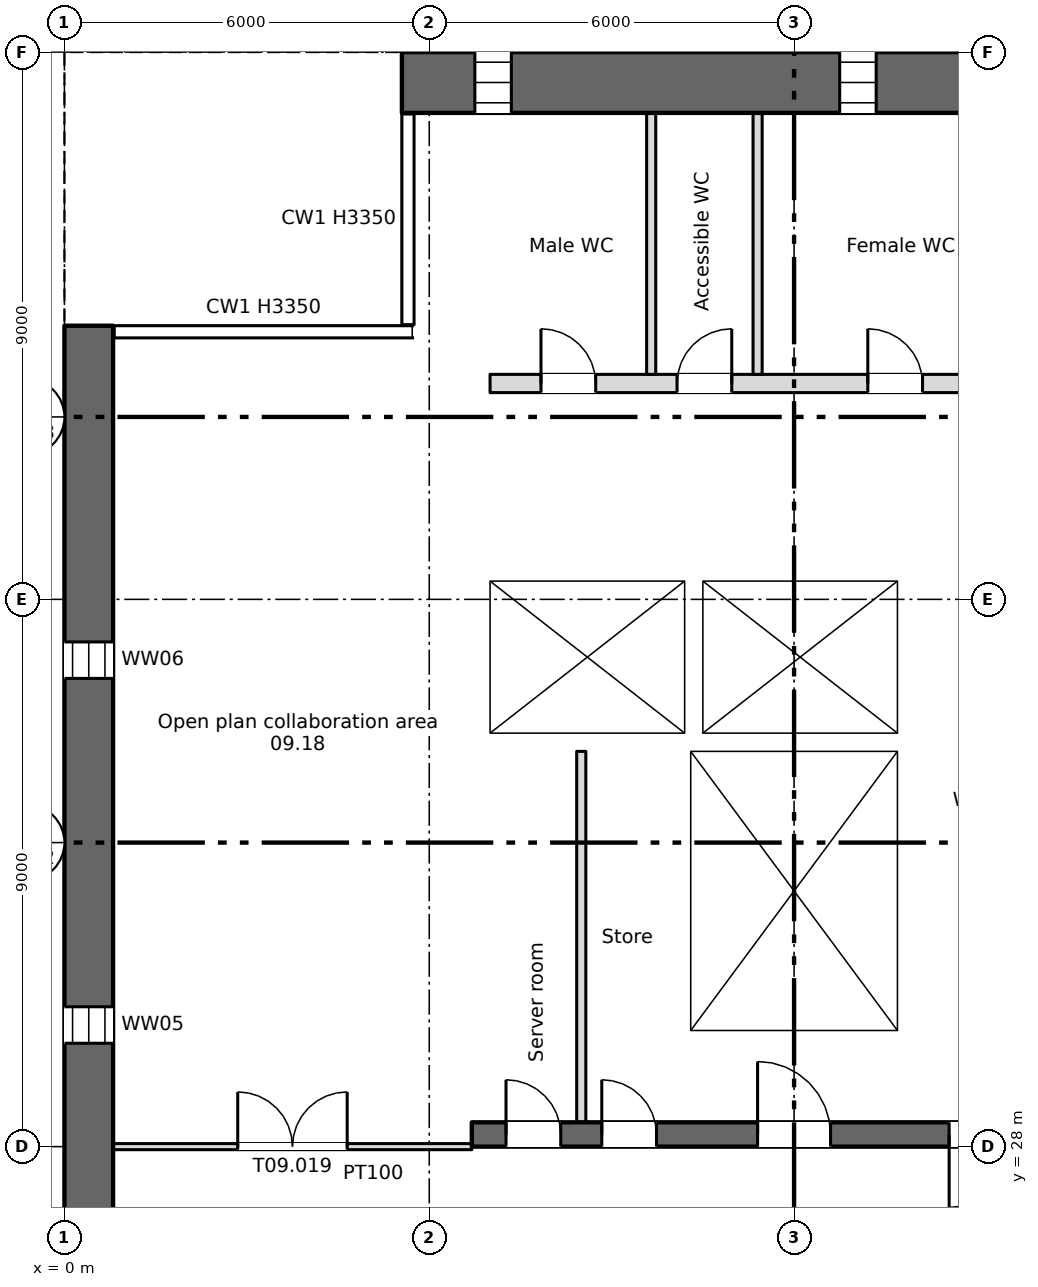
"""IFC4 building model, lengths in metres.
Left out: names, types, materials, properties, quantities, classifications, styles, units other than length and angle.
Written with IfcOpenShell. Run it as: python <this file> out.ifc"""

import sys

from ifc_helpers import new_model, si_unit, direction, frame, frame_2d, origin, place, context, subcontext, project, spatial, rectangle, extrude, element, fill, save


model = new_model("IFC4")
c1 = context("Model", 3, precision=1e-05, world=origin(), true_north=direction((0.0, 1.0)))
c2 = subcontext(c1, "Body", "Model", "MODEL_VIEW")
j1 = project(units=[si_unit("LENGTHUNIT", "METRE"), si_unit("PLANEANGLEUNIT", "RADIAN")], contexts=[c1])
p1 = place(None, origin())
s1 = spatial("IfcSite", under=j1, at=p1, CompositionType="ELEMENT")
p2 = place(p1, origin())
s2 = spatial("IfcBuilding", under=s1, at=p2, CompositionType="ELEMENT")
p3 = place(p2, frame((0.0, 0.0, 41.25)))
s3 = spatial("IfcBuildingStorey", under=s2, at=p3, CompositionType="ELEMENT", Elevation=41.25)
p4 = place(p3, frame((0.4, 4.5, 0.0), z_axis=(0.0, 0.0, 1.0), x_axis=(0.0, 1.0, 0.0)))
e1 = element("IfcWall", 1, at=p4, inside=s3, PredefinedType="SHEAR", context=c2, shape_type="SweptSolid", body=[
    extrude(rectangle(XDim=37.0, YDim=0.8, at=frame_2d((18.5, 0.0))), origin(), (0.0, 0.0, 1.0), 3.35),
])
p5 = place(p4, frame((1.2, 0.0, 0.6)))
e2 = element("IfcOpeningElement", 2, at=p5, cuts=e1, PredefinedType="OPENING", context=c2, shape_type="SweptSolid", body=[
    extrude(rectangle(XDim=0.6, YDim=2.4, at=frame_2d((0.3, 1.2))), frame((0.0, 0.41, 0.0), z_axis=(0.0, -1.0, 0.0), x_axis=(1.0, 0.0, 0.0)), (0.0, 0.0, 1.0), 0.82),
])
p6 = place(p4, frame((7.2, 0.0, 0.6)))
e3 = element("IfcOpeningElement", 3, at=p6, cuts=e1, PredefinedType="OPENING", context=c2, shape_type="SweptSolid", body=[
    extrude(rectangle(XDim=0.6, YDim=2.4, at=frame_2d((0.3, 1.2))), frame((0.0, 0.41, 0.0), z_axis=(0.0, -1.0, 0.0), x_axis=(1.0, 0.0, 0.0)), (0.0, 0.0, 1.0), 0.82),
])
p7 = place(p4, frame((13.2, 0.0, 0.6)))
e4 = element("IfcOpeningElement", 4, at=p7, cuts=e1, PredefinedType="OPENING", context=c2, shape_type="SweptSolid", body=[
    extrude(rectangle(XDim=0.6, YDim=2.4, at=frame_2d((0.3, 1.2))), frame((0.0, 0.41, 0.0), z_axis=(0.0, -1.0, 0.0), x_axis=(1.0, 0.0, 0.0)), (0.0, 0.0, 1.0), 0.82),
])
p8 = place(p4, frame((19.2, 0.0, 0.6)))
e5 = element("IfcOpeningElement", 5, at=p8, cuts=e1, PredefinedType="OPENING", context=c2, shape_type="SweptSolid", body=[
    extrude(rectangle(XDim=0.6, YDim=2.4, at=frame_2d((0.3, 1.2))), frame((0.0, 0.41, 0.0), z_axis=(0.0, -1.0, 0.0), x_axis=(1.0, 0.0, 0.0)), (0.0, 0.0, 1.0), 0.82),
])
p9 = place(p4, frame((25.2, 0.0, 0.6)))
e6 = element("IfcOpeningElement", 6, at=p9, cuts=e1, PredefinedType="OPENING", context=c2, shape_type="SweptSolid", body=[
    extrude(rectangle(XDim=0.6, YDim=2.4, at=frame_2d((0.3, 1.2))), frame((0.0, 0.41, 0.0), z_axis=(0.0, -1.0, 0.0), x_axis=(1.0, 0.0, 0.0)), (0.0, 0.0, 1.0), 0.82),
])
p10 = place(p4, frame((31.2, 0.0, 0.6)))
e7 = element("IfcOpeningElement", 7, at=p10, cuts=e1, PredefinedType="OPENING", context=c2, shape_type="SweptSolid", body=[
    extrude(rectangle(XDim=0.6, YDim=2.4, at=frame_2d((0.3, 1.2))), frame((0.0, 0.41, 0.0), z_axis=(0.0, -1.0, 0.0), x_axis=(1.0, 0.0, 0.0)), (0.0, 0.0, 1.0), 0.82),
])
p11 = place(p3, frame((5.55, 45.5, 0.0), z_axis=(0.0, 0.0, 1.0), x_axis=(1.0, 0.0, 0.0)))
e8 = element("IfcWall", 8, at=p11, inside=s3, PredefinedType="SHEAR", context=c2, shape_type="SweptSolid", body=[
    extrude(rectangle(XDim=66.9, YDim=1.0, at=frame_2d((33.45, 0.0))), origin(), (0.0, 0.0, 1.0), 3.35),
])
p12 = place(p11, frame((1.2, 0.0, 0.6)))
e9 = element("IfcOpeningElement", 9, at=p12, cuts=e8, PredefinedType="OPENING", context=c2, shape_type="SweptSolid", body=[
    extrude(rectangle(XDim=0.6, YDim=2.4, at=frame_2d((0.3, 1.2))), frame((0.0, 0.51, 0.0), z_axis=(0.0, -1.0, 0.0), x_axis=(1.0, 0.0, 0.0)), (0.0, 0.0, 1.0), 1.02),
])
p13 = place(p11, frame((7.2, 0.0, 0.6)))
e10 = element("IfcOpeningElement", 10, at=p13, cuts=e8, PredefinedType="OPENING", context=c2, shape_type="SweptSolid", body=[
    extrude(rectangle(XDim=0.6, YDim=2.4, at=frame_2d((0.3, 1.2))), frame((0.0, 0.51, 0.0), z_axis=(0.0, -1.0, 0.0), x_axis=(1.0, 0.0, 0.0)), (0.0, 0.0, 1.0), 1.02),
])
p14 = place(p11, frame((55.2, 0.0, 0.6)))
e11 = element("IfcOpeningElement", 11, at=p14, cuts=e8, PredefinedType="OPENING", context=c2, shape_type="SweptSolid", body=[
    extrude(rectangle(XDim=0.6, YDim=2.4, at=frame_2d((0.3, 1.2))), frame((0.0, 0.51, 0.0), z_axis=(0.0, -1.0, 0.0), x_axis=(1.0, 0.0, 0.0)), (0.0, 0.0, 1.0), 1.02),
])
p15 = place(p11, frame((61.2, 0.0, 0.6)))
e12 = element("IfcOpeningElement", 12, at=p15, cuts=e8, PredefinedType="OPENING", context=c2, shape_type="SweptSolid", body=[
    extrude(rectangle(XDim=0.6, YDim=2.4, at=frame_2d((0.3, 1.2))), frame((0.0, 0.51, 0.0), z_axis=(0.0, -1.0, 0.0), x_axis=(1.0, 0.0, 0.0)), (0.0, 0.0, 1.0), 1.02),
])
p16 = place(p3, frame((6.7, 28.2, 0.0), z_axis=(0.0, 0.0, 1.0), x_axis=(1.0, 0.0, 0.0)))
e13 = element("IfcWall", 13, at=p16, inside=s3, PredefinedType="SHEAR", context=c2, shape_type="SweptSolid", body=[
    extrude(rectangle(XDim=57.8, YDim=0.4, at=frame_2d((28.9, 0.0))), origin(), (0.0, 0.0, 1.0), 3.35),
])
p17 = place(p16, frame((12.812, 0.0, 0.0)))
e14 = element("IfcOpeningElement", 14, at=p17, cuts=e13, PredefinedType="OPENING", context=c2, shape_type="SweptSolid", body=[
    extrude(rectangle(XDim=0.9, YDim=2.1, at=frame_2d((0.45, 1.05))), frame((0.0, 0.21, 0.0), z_axis=(0.0, -1.0, 0.0), x_axis=(1.0, 0.0, 0.0)), (0.0, 0.0, 1.0), 0.42),
])
p18 = place(p16, frame((15.387, 0.0, 0.0)))
e15 = element("IfcOpeningElement", 15, at=p18, cuts=e13, PredefinedType="OPENING", context=c2, shape_type="SweptSolid", body=[
    extrude(rectangle(XDim=0.9, YDim=2.1, at=frame_2d((0.45, 1.05))), frame((0.0, 0.21, 0.0), z_axis=(0.0, -1.0, 0.0), x_axis=(1.0, 0.0, 0.0)), (0.0, 0.0, 1.0), 0.42),
])
p19 = place(p16, frame((48.312, 0.0, 0.0)))
e16 = element("IfcOpeningElement", 16, at=p19, cuts=e13, PredefinedType="OPENING", context=c2, shape_type="SweptSolid", body=[
    extrude(rectangle(XDim=0.9, YDim=2.1, at=frame_2d((0.45, 1.05))), frame((0.0, 0.21, 0.0), z_axis=(0.0, -1.0, 0.0), x_axis=(1.0, 0.0, 0.0)), (0.0, 0.0, 1.0), 0.42),
])
p20 = place(p16, frame((50.887, 0.0, 0.0)))
e17 = element("IfcOpeningElement", 17, at=p20, cuts=e13, PredefinedType="OPENING", context=c2, shape_type="SweptSolid", body=[
    extrude(rectangle(XDim=0.9, YDim=2.1, at=frame_2d((0.45, 1.05))), frame((0.0, 0.21, 0.0), z_axis=(0.0, -1.0, 0.0), x_axis=(1.0, 0.0, 0.0)), (0.0, 0.0, 1.0), 0.42),
])
p21 = place(p16, frame((0.562, 0.0, 0.0)))
e18 = element("IfcOpeningElement", 18, at=p21, cuts=e13, PredefinedType="OPENING", context=c2, shape_type="SweptSolid", body=[
    extrude(rectangle(XDim=0.9, YDim=2.1, at=frame_2d((0.45, 1.05))), frame((0.0, 0.21, 0.0), z_axis=(0.0, -1.0, 0.0), x_axis=(1.0, 0.0, 0.0)), (0.0, 0.0, 1.0), 0.42),
])
p22 = place(p16, frame((2.137, 0.0, 0.0)))
e19 = element("IfcOpeningElement", 19, at=p22, cuts=e13, PredefinedType="OPENING", context=c2, shape_type="SweptSolid", body=[
    extrude(rectangle(XDim=0.9, YDim=2.1, at=frame_2d((0.45, 1.05))), frame((0.0, 0.21, 0.0), z_axis=(0.0, -1.0, 0.0), x_axis=(1.0, 0.0, 0.0)), (0.0, 0.0, 1.0), 0.42),
])
p23 = place(p16, frame((4.7, 0.0, 0.0)))
e20 = element("IfcOpeningElement", 20, at=p23, cuts=e13, PredefinedType="OPENING", context=c2, shape_type="SweptSolid", body=[
    extrude(rectangle(XDim=1.2, YDim=2.1, at=frame_2d((0.6, 1.05))), frame((0.0, 0.21, 0.0), z_axis=(0.0, -1.0, 0.0), x_axis=(1.0, 0.0, 0.0)), (0.0, 0.0, 1.0), 0.42),
])
p24 = place(p16, frame((31.7, 0.0, 0.0)))
e21 = element("IfcOpeningElement", 21, at=p24, cuts=e13, PredefinedType="OPENING", context=c2, shape_type="SweptSolid", body=[
    extrude(rectangle(XDim=1.2, YDim=2.1, at=frame_2d((0.6, 1.05))), frame((0.0, 0.21, 0.0), z_axis=(0.0, -1.0, 0.0), x_axis=(1.0, 0.0, 0.0)), (0.0, 0.0, 1.0), 0.42),
])
p25 = place(p16, frame((55.2, 0.0, 0.0)))
e22 = element("IfcOpeningElement", 22, at=p25, cuts=e13, PredefinedType="OPENING", context=c2, shape_type="SweptSolid", body=[
    extrude(rectangle(XDim=1.2, YDim=2.1, at=frame_2d((0.6, 1.05))), frame((0.0, 0.21, 0.0), z_axis=(0.0, -1.0, 0.0), x_axis=(1.0, 0.0, 0.0)), (0.0, 0.0, 1.0), 0.42),
])
p26 = place(p16, frame((21.7, 0.0, 0.0)))
e23 = element("IfcOpeningElement", 23, at=p26, cuts=e13, PredefinedType="OPENING", context=c2, shape_type="SweptSolid", body=[
    extrude(rectangle(XDim=1.2, YDim=2.1, at=frame_2d((0.6, 1.05))), frame((0.0, 0.21, 0.0), z_axis=(0.0, -1.0, 0.0), x_axis=(1.0, 0.0, 0.0)), (0.0, 0.0, 1.0), 0.42),
])
p27 = place(p16, frame((41.7, 0.0, 0.0)))
e24 = element("IfcOpeningElement", 24, at=p27, cuts=e13, PredefinedType="OPENING", context=c2, shape_type="SweptSolid", body=[
    extrude(rectangle(XDim=1.2, YDim=2.1, at=frame_2d((0.6, 1.05))), frame((0.0, 0.21, 0.0), z_axis=(0.0, -1.0, 0.0), x_axis=(1.0, 0.0, 0.0)), (0.0, 0.0, 1.0), 0.42),
])
p28 = place(p16, frame((24.85, 0.0, 0.0)))
e25 = element("IfcOpeningElement", 25, at=p28, cuts=e13, PredefinedType="OPENING", context=c2, shape_type="SweptSolid", body=[
    extrude(rectangle(XDim=2.4, YDim=2.1, at=frame_2d((1.2, 1.05))), frame((0.0, 0.21, 0.0), z_axis=(0.0, -1.0, 0.0), x_axis=(1.0, 0.0, 0.0)), (0.0, 0.0, 1.0), 0.42),
])
p29 = place(p16, frame((37.35, 0.0, 0.0)))
e26 = element("IfcOpeningElement", 26, at=p29, cuts=e13, PredefinedType="OPENING", context=c2, shape_type="SweptSolid", body=[
    extrude(rectangle(XDim=2.4, YDim=2.1, at=frame_2d((1.2, 1.05))), frame((0.0, 0.21, 0.0), z_axis=(0.0, -1.0, 0.0), x_axis=(1.0, 0.0, 0.0)), (0.0, 0.0, 1.0), 0.42),
])
p30 = place(p16, frame((7.85, 0.0, 0.0)))
e27 = element("IfcOpeningElement", 27, at=p30, cuts=e13, PredefinedType="OPENING", context=c2, shape_type="SweptSolid", body=[
    extrude(rectangle(XDim=2.4, YDim=2.1, at=frame_2d((1.2, 1.05))), frame((0.0, 0.21, 0.0), z_axis=(0.0, -1.0, 0.0), x_axis=(1.0, 0.0, 0.0)), (0.0, 0.0, 1.0), 0.42),
])
p31 = place(p16, frame((28.85, 0.0, 0.0)))
e28 = element("IfcOpeningElement", 28, at=p31, cuts=e13, PredefinedType="OPENING", context=c2, shape_type="SweptSolid", body=[
    extrude(rectangle(XDim=0.9, YDim=2.1, at=frame_2d((0.45, 1.05))), frame((0.0, 0.21, 0.0), z_axis=(0.0, -1.0, 0.0), x_axis=(1.0, 0.0, 0.0)), (0.0, 0.0, 1.0), 0.42),
])
p32 = place(p16, frame((34.85, 0.0, 0.0)))
e29 = element("IfcOpeningElement", 29, at=p32, cuts=e13, PredefinedType="OPENING", context=c2, shape_type="SweptSolid", body=[
    extrude(rectangle(XDim=0.9, YDim=2.1, at=frame_2d((0.45, 1.05))), frame((0.0, 0.21, 0.0), z_axis=(0.0, -1.0, 0.0), x_axis=(1.0, 0.0, 0.0)), (0.0, 0.0, 1.0), 0.42),
])
p33 = place(p3, frame((6.85, 28.4, 0.0), z_axis=(0.0, 0.0, 1.0), x_axis=(0.0, 1.0, 0.0)))
e30 = element("IfcWall", 30, at=p33, inside=s3, PredefinedType="SHEAR", context=c2, shape_type="SweptSolid", body=[
    extrude(rectangle(XDim=16.6, YDim=0.3, at=frame_2d((8.3, 0.0))), origin(), (0.0, 0.0, 1.0), 3.35),
])
for number, where, z_axis, x_axis in (
    (31, (10.15, 28.4, 0.0), (0.0, 0.0, 1.0), (0.0, 1.0, 0.0)),
    (32, (13.85, 28.4, 0.0), (0.0, 0.0, 1.0), (0.0, 1.0, 0.0)),
):
    element("IfcWall", number, at=place(p3, frame(where, z_axis=z_axis, x_axis=x_axis)), inside=s3, PredefinedType="SHEAR", context=c2, shape_type="SweptSolid", body=[
        extrude(rectangle(XDim=6.1, YDim=0.3, at=frame_2d((3.05, 0.0))), origin(), (0.0, 0.0, 1.0), 3.35),
    ])
for number, where, z_axis, x_axis in (
    (33, (7.0, 34.65, 0.0), (0.0, 0.0, 1.0), (1.0, 0.0, 0.0)),
    (34, (7.0, 37.45, 0.0), (0.0, 0.0, 1.0), (1.0, 0.0, 0.0)),
):
    element("IfcWall", number, at=place(p3, frame(where, z_axis=z_axis, x_axis=x_axis)), inside=s3, PredefinedType="SHEAR", context=c2, shape_type="SweptSolid", body=[
        extrude(rectangle(XDim=7.0, YDim=0.3, at=frame_2d((3.5, 0.0))), origin(), (0.0, 0.0, 1.0), 3.35),
    ])
p34 = place(p3, frame((13.85, 34.8, 0.0), z_axis=(0.0, 0.0, 1.0), x_axis=(0.0, 1.0, 0.0)))
e35 = element("IfcWall", 35, at=p34, inside=s3, PredefinedType="SHEAR", context=c2, shape_type="SweptSolid", body=[
    extrude(rectangle(XDim=2.5, YDim=0.3, at=frame_2d((1.25, 0.0))), origin(), (0.0, 0.0, 1.0), 3.35),
])
p35 = place(p3, frame((7.0, 40.55, 0.0), z_axis=(0.0, 0.0, 1.0), x_axis=(1.0, 0.0, 0.0)))
e36 = element("IfcWall", 36, at=p35, inside=s3, PredefinedType="PARTITIONING", context=c2, shape_type="SweptSolid", body=[
    extrude(rectangle(XDim=9.0, YDim=0.3, at=frame_2d((4.5, 0.0))), origin(), (0.0, 0.0, 1.0), 3.35),
])
p36 = place(p35, frame((0.837, 0.0, 0.0)))
e37 = element("IfcOpeningElement", 37, at=p36, cuts=e36, PredefinedType="OPENING", context=c2, shape_type="SweptSolid", body=[
    extrude(rectangle(XDim=0.9, YDim=2.1, at=frame_2d((0.45, 1.05))), frame((0.0, 0.16, 0.0), z_axis=(0.0, -1.0, 0.0), x_axis=(1.0, 0.0, 0.0)), (0.0, 0.0, 1.0), 0.32),
])
p37 = place(p35, frame((3.075, 0.0, 0.0)))
e38 = element("IfcOpeningElement", 38, at=p37, cuts=e36, PredefinedType="OPENING", context=c2, shape_type="SweptSolid", body=[
    extrude(rectangle(XDim=0.9, YDim=2.1, at=frame_2d((0.45, 1.05))), frame((0.0, 0.16, 0.0), z_axis=(0.0, -1.0, 0.0), x_axis=(1.0, 0.0, 0.0)), (0.0, 0.0, 1.0), 0.32),
])
p38 = place(p35, frame((6.212, 0.0, 0.0)))
e39 = element("IfcOpeningElement", 39, at=p38, cuts=e36, PredefinedType="OPENING", context=c2, shape_type="SweptSolid", body=[
    extrude(rectangle(XDim=0.9, YDim=2.1, at=frame_2d((0.45, 1.05))), frame((0.0, 0.16, 0.0), z_axis=(0.0, -1.0, 0.0), x_axis=(1.0, 0.0, 0.0)), (0.0, 0.0, 1.0), 0.32),
])
p39 = place(p3, frame((10.35, 34.8, 0.0), z_axis=(0.0, 0.0, 1.0), x_axis=(0.0, 1.0, 0.0)))
e40 = element("IfcWall", 40, at=p39, inside=s3, PredefinedType="SHEAR", context=c2, shape_type="SweptSolid", body=[
    extrude(rectangle(XDim=2.5, YDim=0.3, at=frame_2d((1.25, 0.0))), origin(), (0.0, 0.0, 1.0), 3.35),
])
p40 = place(p3, frame((8.5, 28.4, 0.0), z_axis=(0.0, 0.0, 1.0), x_axis=(0.0, 1.0, 0.0)))
e41 = element("IfcWall", 41, at=p40, inside=s3, PredefinedType="PARTITIONING", context=c2, shape_type="SweptSolid", body=[
    extrude(rectangle(XDim=6.1, YDim=0.15, at=frame_2d((3.05, 0.0))), origin(), (0.0, 0.0, 1.0), 3.35),
])
for number, where, z_axis, x_axis in (
    (42, (9.65, 40.7, 0.0), (0.0, 0.0, 1.0), (0.0, 1.0, 0.0)),
    (43, (11.4, 40.7, 0.0), (0.0, 0.0, 1.0), (0.0, 1.0, 0.0)),
):
    element("IfcWall", number, at=place(p3, frame(where, z_axis=z_axis, x_axis=x_axis)), inside=s3, PredefinedType="PARTITIONING", context=c2, shape_type="SweptSolid", body=[
        extrude(rectangle(XDim=4.3, YDim=0.15, at=frame_2d((2.15, 0.0))), origin(), (0.0, 0.0, 1.0), 3.35),
    ])
p41 = place(p3, frame((0.8, 28.0, 0.0), z_axis=(0.0, 0.0, 1.0), x_axis=(1.0, 0.0, 0.0)))
e44 = element("IfcWall", 44, at=p41, inside=s3, PredefinedType="PARTITIONING", context=c2, shape_type="SweptSolid", body=[
    extrude(rectangle(XDim=5.9, YDim=0.1, at=frame_2d((2.95, 0.0))), origin(), (0.0, 0.0, 1.0), 3.35),
])
p42 = place(p41, frame((2.05, 0.0, 0.0)))
e45 = element("IfcOpeningElement", 45, at=p42, cuts=e44, PredefinedType="OPENING", context=c2, shape_type="SweptSolid", body=[
    extrude(rectangle(XDim=1.8, YDim=2.1, at=frame_2d((0.9, 1.05))), frame((0.0, 0.06, 0.0), z_axis=(0.0, -1.0, 0.0), x_axis=(1.0, 0.0, 0.0)), (0.0, 0.0, 1.0), 0.12),
])
p43 = place(p12, origin())
e46 = element("IfcWindow", 46, at=p43, inside=s3, PartitioningType="SINGLE_PANEL", PredefinedType="WINDOW", context=c2, shape_type="SweptSolid", body=[
    extrude(rectangle(XDim=0.6, YDim=2.4, at=frame_2d((0.3, 1.2))), frame((0.0, 0.03, 0.0), z_axis=(0.0, -1.0, 0.0), x_axis=(1.0, 0.0, 0.0)), (0.0, 0.0, 1.0), 0.06),
])
fill(e9, e46)
p44 = place(p13, origin())
e47 = element("IfcWindow", 47, at=p44, inside=s3, PartitioningType="SINGLE_PANEL", PredefinedType="WINDOW", context=c2, shape_type="SweptSolid", body=[
    extrude(rectangle(XDim=0.6, YDim=2.4, at=frame_2d((0.3, 1.2))), frame((0.0, 0.03, 0.0), z_axis=(0.0, -1.0, 0.0), x_axis=(1.0, 0.0, 0.0)), (0.0, 0.0, 1.0), 0.06),
])
fill(e10, e47)
p45 = place(p9, origin())
e48 = element("IfcWindow", 48, at=p45, inside=s3, PartitioningType="SINGLE_PANEL", PredefinedType="WINDOW", context=c2, shape_type="SweptSolid", body=[
    extrude(rectangle(XDim=0.6, YDim=2.4, at=frame_2d((0.3, 1.2))), frame((0.0, 0.03, 0.0), z_axis=(0.0, -1.0, 0.0), x_axis=(1.0, 0.0, 0.0)), (0.0, 0.0, 1.0), 0.06),
])
fill(e6, e48)
p46 = place(p10, origin())
e49 = element("IfcWindow", 49, at=p46, inside=s3, PartitioningType="SINGLE_PANEL", PredefinedType="WINDOW", context=c2, shape_type="SweptSolid", body=[
    extrude(rectangle(XDim=0.6, YDim=2.4, at=frame_2d((0.3, 1.2))), frame((0.0, 0.03, 0.0), z_axis=(0.0, -1.0, 0.0), x_axis=(1.0, 0.0, 0.0)), (0.0, 0.0, 1.0), 0.06),
])
fill(e7, e49)
p47 = place(p21, origin())
e50 = element("IfcDoor", 50, at=p47, inside=s3, OperationType="SINGLE_SWING_LEFT", PredefinedType="DOOR", context=c2, shape_type="SweptSolid", body=[
    extrude(rectangle(XDim=0.9, YDim=2.1, at=frame_2d((0.45, 1.05))), frame((0.0, 0.025, 0.0), z_axis=(0.0, -1.0, 0.0), x_axis=(1.0, 0.0, 0.0)), (0.0, 0.0, 1.0), 0.05),
])
fill(e18, e50)
p48 = place(p22, origin())
e51 = element("IfcDoor", 51, at=p48, inside=s3, OperationType="SINGLE_SWING_LEFT", PredefinedType="DOOR", context=c2, shape_type="SweptSolid", body=[
    extrude(rectangle(XDim=0.9, YDim=2.1, at=frame_2d((0.45, 1.05))), frame((0.0, 0.025, 0.0), z_axis=(0.0, -1.0, 0.0), x_axis=(1.0, 0.0, 0.0)), (0.0, 0.0, 1.0), 0.05),
])
fill(e19, e51)
p49 = place(p36, origin())
e52 = element("IfcDoor", 52, at=p49, inside=s3, OperationType="SINGLE_SWING_LEFT", PredefinedType="DOOR", context=c2, shape_type="SweptSolid", body=[
    extrude(rectangle(XDim=0.9, YDim=2.1, at=frame_2d((0.45, 1.05))), frame((0.0, 0.025, 0.0), z_axis=(0.0, -1.0, 0.0), x_axis=(1.0, 0.0, 0.0)), (0.0, 0.0, 1.0), 0.05),
])
fill(e37, e52)
p50 = place(p37, origin())
e53 = element("IfcDoor", 53, at=p50, inside=s3, OperationType="SINGLE_SWING_RIGHT", PredefinedType="DOOR", context=c2, shape_type="SweptSolid", body=[
    extrude(rectangle(XDim=0.9, YDim=2.1, at=frame_2d((0.45, 1.05))), frame((0.0, 0.025, 0.0), z_axis=(0.0, -1.0, 0.0), x_axis=(1.0, 0.0, 0.0)), (0.0, 0.0, 1.0), 0.05),
])
fill(e38, e53)
p51 = place(p38, origin())
e54 = element("IfcDoor", 54, at=p51, inside=s3, OperationType="SINGLE_SWING_LEFT", PredefinedType="DOOR", context=c2, shape_type="SweptSolid", body=[
    extrude(rectangle(XDim=0.9, YDim=2.1, at=frame_2d((0.45, 1.05))), frame((0.0, 0.025, 0.0), z_axis=(0.0, -1.0, 0.0), x_axis=(1.0, 0.0, 0.0)), (0.0, 0.0, 1.0), 0.05),
])
fill(e39, e54)
p52 = place(p23, origin())
e55 = element("IfcDoor", 55, at=p52, inside=s3, OperationType="SINGLE_SWING_LEFT", PredefinedType="DOOR", context=c2, shape_type="SweptSolid", body=[
    extrude(rectangle(XDim=1.2, YDim=2.1, at=frame_2d((0.6, 1.05))), frame((0.0, 0.025, 0.0), z_axis=(0.0, -1.0, 0.0), x_axis=(1.0, 0.0, 0.0)), (0.0, 0.0, 1.0), 0.05),
])
fill(e20, e55)
p53 = place(p30, origin())
e56 = element("IfcDoor", 56, at=p53, inside=s3, OperationType="DOUBLE_DOOR_SINGLE_SWING", PredefinedType="DOOR", context=c2, shape_type="SweptSolid", body=[
    extrude(rectangle(XDim=2.4, YDim=2.1, at=frame_2d((1.2, 1.05))), frame((0.0, 0.025, 0.0), z_axis=(0.0, -1.0, 0.0), x_axis=(1.0, 0.0, 0.0)), (0.0, 0.0, 1.0), 0.05),
])
fill(e27, e56)
p54 = place(p42, origin())
e57 = element("IfcDoor", 57, at=p54, inside=s3, OperationType="DOUBLE_DOOR_SINGLE_SWING", PredefinedType="DOOR", context=c2, shape_type="SweptSolid", body=[
    extrude(rectangle(XDim=1.8, YDim=2.1, at=frame_2d((0.9, 1.05))), frame((0.0, 0.025, 0.0), z_axis=(0.0, -1.0, 0.0), x_axis=(1.0, 0.0, 0.0)), (0.0, 0.0, 1.0), 0.05),
])
fill(e45, e57)
save(model, sys.argv[1])
